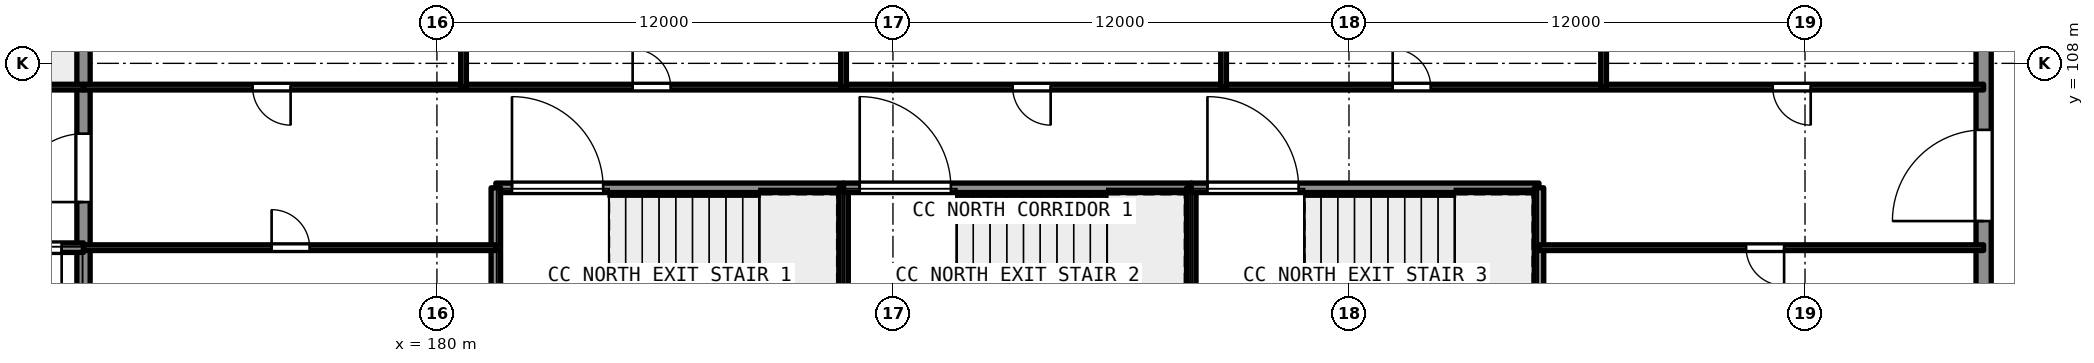
"""IFC4 building model, lengths in metres.
Left out: names, types, materials, properties, quantities, classifications, styles, units other than length and angle.
Written with IfcOpenShell. Run it as: python <this file> out.ifc"""

import sys

from ifc_helpers import new_model, si_unit, direction, frame, frame_2d, origin, place, context, subcontext, project, spatial, rectangle, extrude, element, fill, save


model = new_model("IFC4")
c1 = context("Model", 3, precision=1e-05, world=origin(), true_north=direction((0.0, 1.0)))
c2 = subcontext(c1, "Body", "Model", "MODEL_VIEW")
j1 = project(units=[si_unit("LENGTHUNIT", "METRE"), si_unit("PLANEANGLEUNIT", "RADIAN")], contexts=[c1])
p1 = place(None, origin())
s1 = spatial("IfcSite", under=j1, at=p1, CompositionType="ELEMENT")
p2 = place(p1, origin())
s2 = spatial("IfcBuilding", under=s1, at=p2, CompositionType="ELEMENT")
p3 = place(p2, frame((0.0, 0.0, 9.0)))
s3 = spatial("IfcBuildingStorey", under=s2, at=p3, CompositionType="ELEMENT", Elevation=9.0)
p4 = place(p3, frame((220.7, 100.4, 0.0), z_axis=(0.0, 0.0, 1.0), x_axis=(0.0, 1.0, 0.0)))
e1 = element("IfcWall", 1, at=p4, inside=s3, PredefinedType="SHEAR", context=c2, shape_type="SweptSolid", body=[
    extrude(rectangle(XDim=9.2, YDim=0.4, at=frame_2d((4.6, 0.0))), origin(), (0.0, 0.0, 1.0), 6.0),
])
p5 = place(p4, frame((3.45, 0.0, 0.0)))
e2 = element("IfcOpeningElement", 2, at=p5, cuts=e1, PredefinedType="OPENING", context=c2, shape_type="SweptSolid", body=[
    extrude(rectangle(XDim=2.4, YDim=2.4, at=frame_2d((1.2, 1.2))), frame((0.0, 0.21, 0.0), z_axis=(0.0, -1.0, 0.0), x_axis=(1.0, 0.0, 0.0)), (0.0, 0.0, 1.0), 0.421),
])
p6 = place(p3, frame((170.7, 100.0, 0.0), z_axis=(0.0, 0.0, 1.0), x_axis=(0.0, 1.0, 0.0)))
e3 = element("IfcWall", 3, at=p6, inside=s3, PredefinedType="SHEAR", context=c2, shape_type="SweptSolid", body=[
    extrude(rectangle(XDim=3.15, YDim=0.35, at=frame_2d((1.575, 0.0))), origin(), (0.0, 0.0, 1.0), 5.59),
])
p7 = place(p3, frame((170.7, 103.15, 0.0), z_axis=(0.0, 0.0, 1.0), x_axis=(0.0, 1.0, 0.0)))
e4 = element("IfcWall", 4, at=p7, inside=s3, PredefinedType="SHEAR", context=c2, shape_type="SweptSolid", body=[
    extrude(rectangle(XDim=7.25, YDim=0.35, at=frame_2d((3.625, 0.0))), origin(), (0.0, 0.0, 1.0), 5.59),
])
p8 = place(p7, frame((1.2, 0.0, 0.0)))
e5 = element("IfcOpeningElement", 5, at=p8, cuts=e4, PredefinedType="OPENING", context=c2, shape_type="SweptSolid", body=[
    extrude(rectangle(XDim=1.8, YDim=2.1, at=frame_2d((0.9, 1.05))), frame((0.0, 0.186, 0.0), z_axis=(0.0, -1.0, 0.0), x_axis=(1.0, 0.0, 0.0)), (0.0, 0.0, 1.0), 0.371),
])
p9 = place(p3, frame((163.0, 103.15, 0.0), z_axis=(0.0, 0.0, 1.0), x_axis=(1.0, 0.0, 0.0)))
e6 = element("IfcWall", 6, at=p9, inside=s3, PredefinedType="SHEAR", context=c2, shape_type="SweptSolid", body=[
    extrude(rectangle(XDim=7.7, YDim=0.25, at=frame_2d((3.85, 0.0))), origin(), (0.0, 0.0, 1.0), 5.59),
])
p10 = place(p9, frame((5.925, 0.0, 0.0)))
e7 = element("IfcOpeningElement", 7, at=p10, cuts=e6, PredefinedType="OPENING", context=c2, shape_type="SweptSolid", body=[
    extrude(rectangle(XDim=1.2, YDim=2.1, at=frame_2d((0.6, 1.05))), frame((0.0, 0.135, 0.0), z_axis=(0.0, -1.0, 0.0), x_axis=(1.0, 0.0, 0.0)), (0.0, 0.0, 1.0), 0.271),
])
p11 = place(p3, frame((163.875, 107.375, 0.0), z_axis=(0.0, 0.0, 1.0), x_axis=(1.0, 0.0, 0.0)))
e8 = element("IfcWall", 8, at=p11, inside=s3, PredefinedType="PARTITIONING", context=c2, shape_type="SweptSolid", body=[
    extrude(rectangle(XDim=6.825, YDim=0.15, at=frame_2d((3.413, 0.0))), origin(), (0.0, 0.0, 1.0), 5.59),
])
p12 = place(p11, frame((2.95, 0.0, 0.0)))
e9 = element("IfcOpeningElement", 9, at=p12, cuts=e8, PredefinedType="OPENING", context=c2, shape_type="SweptSolid", body=[
    extrude(rectangle(XDim=0.9, YDim=2.1, at=frame_2d((0.45, 1.05))), frame((0.0, 0.085, 0.0), z_axis=(0.0, -1.0, 0.0), x_axis=(1.0, 0.0, 0.0)), (0.0, 0.0, 1.0), 0.171),
])
p13 = place(p3, frame((181.55, 104.725, 0.0), z_axis=(0.0, 0.0, 1.0), x_axis=(1.0, 0.0, 0.0)))
e10 = element("IfcWall", 10, at=p13, inside=s3, PredefinedType="SHEAR", context=c2, shape_type="SweptSolid", body=[
    extrude(rectangle(XDim=9.15, YDim=0.25, at=frame_2d((4.575, 0.0))), origin(), (0.0, 0.0, 1.0), 5.59),
])
p14 = place(p13, frame((0.425, 0.0, 0.0)))
e11 = element("IfcOpeningElement", 11, at=p14, cuts=e10, PredefinedType="OPENING", context=c2, shape_type="SweptSolid", body=[
    extrude(rectangle(XDim=2.4, YDim=2.1, at=frame_2d((1.2, 1.05))), frame((0.0, 0.135, 0.0), z_axis=(0.0, -1.0, 0.0), x_axis=(1.0, 0.0, 0.0)), (0.0, 0.0, 1.0), 0.271),
])
p15 = place(p3, frame((181.55, 100.2, 0.0), z_axis=(0.0, 0.0, 1.0), x_axis=(0.0, 1.0, 0.0)))
e12 = element("IfcWall", 12, at=p15, inside=s3, PredefinedType="SHEAR", context=c2, shape_type="SweptSolid", body=[
    extrude(rectangle(XDim=4.525, YDim=0.25, at=frame_2d((2.263, 0.0))), origin(), (0.0, 0.0, 1.0), 5.59),
])
p16 = place(p3, frame((190.7, 100.4, 0.0), z_axis=(0.0, 0.0, 1.0), x_axis=(0.0, 1.0, 0.0)))
e13 = element("IfcWall", 13, at=p16, inside=s3, PredefinedType="SHEAR", context=c2, shape_type="SweptSolid", body=[
    extrude(rectangle(XDim=4.325, YDim=0.25, at=frame_2d((2.163, 0.0))), origin(), (0.0, 0.0, 1.0), 5.59),
])
p17 = place(p3, frame((190.7, 104.725, 0.0), z_axis=(0.0, 0.0, 1.0), x_axis=(1.0, 0.0, 0.0)))
e14 = element("IfcWall", 14, at=p17, inside=s3, PredefinedType="SHEAR", context=c2, shape_type="SweptSolid", body=[
    extrude(rectangle(XDim=9.15, YDim=0.25, at=frame_2d((4.575, 0.0))), origin(), (0.0, 0.0, 1.0), 5.59),
])
p18 = place(p17, frame((0.425, 0.0, 0.0)))
e15 = element("IfcOpeningElement", 15, at=p18, cuts=e14, PredefinedType="OPENING", context=c2, shape_type="SweptSolid", body=[
    extrude(rectangle(XDim=2.4, YDim=2.1, at=frame_2d((1.2, 1.05))), frame((0.0, 0.135, 0.0), z_axis=(0.0, -1.0, 0.0), x_axis=(1.0, 0.0, 0.0)), (0.0, 0.0, 1.0), 0.271),
])
p19 = place(p3, frame((199.85, 100.2, 0.0), z_axis=(0.0, 0.0, 1.0), x_axis=(0.0, 1.0, 0.0)))
e16 = element("IfcWall", 16, at=p19, inside=s3, PredefinedType="SHEAR", context=c2, shape_type="SweptSolid", body=[
    extrude(rectangle(XDim=4.525, YDim=0.25, at=frame_2d((2.263, 0.0))), origin(), (0.0, 0.0, 1.0), 5.59),
])
p20 = place(p3, frame((199.85, 104.725, 0.0), z_axis=(0.0, 0.0, 1.0), x_axis=(1.0, 0.0, 0.0)))
e17 = element("IfcWall", 17, at=p20, inside=s3, PredefinedType="SHEAR", context=c2, shape_type="SweptSolid", body=[
    extrude(rectangle(XDim=9.15, YDim=0.25, at=frame_2d((4.575, 0.0))), origin(), (0.0, 0.0, 1.0), 5.59),
])
p21 = place(p20, frame((0.425, 0.0, 0.0)))
e18 = element("IfcOpeningElement", 18, at=p21, cuts=e17, PredefinedType="OPENING", context=c2, shape_type="SweptSolid", body=[
    extrude(rectangle(XDim=2.4, YDim=2.1, at=frame_2d((1.2, 1.05))), frame((0.0, 0.135, 0.0), z_axis=(0.0, -1.0, 0.0), x_axis=(1.0, 0.0, 0.0)), (0.0, 0.0, 1.0), 0.271),
])
p22 = place(p3, frame((209.0, 100.0, 0.0), z_axis=(0.0, 0.0, 1.0), x_axis=(0.0, 1.0, 0.0)))
e19 = element("IfcWall", 19, at=p22, inside=s3, PredefinedType="SHEAR", context=c2, shape_type="SweptSolid", body=[
    extrude(rectangle(XDim=4.725, YDim=0.25, at=frame_2d((2.363, 0.0))), origin(), (0.0, 0.0, 1.0), 5.59),
])
p23 = place(p3, frame((170.7, 103.15, 0.0), z_axis=(0.0, 0.0, 1.0), x_axis=(1.0, 0.0, 0.0)))
e20 = element("IfcWall", 20, at=p23, inside=s3, PredefinedType="PARTITIONING", context=c2, shape_type="SweptSolid", body=[
    extrude(rectangle(XDim=10.85, YDim=0.15, at=frame_2d((5.425, 0.0))), origin(), (0.0, 0.0, 1.0), 5.59),
])
p24 = place(p23, frame((4.95, 0.0, 0.0)))
e21 = element("IfcOpeningElement", 21, at=p24, cuts=e20, PredefinedType="OPENING", context=c2, shape_type="SweptSolid", body=[
    extrude(rectangle(XDim=1.0, YDim=2.1, at=frame_2d((0.5, 1.05))), frame((0.0, 0.085, 0.0), z_axis=(0.0, -1.0, 0.0), x_axis=(1.0, 0.0, 0.0)), (0.0, 0.0, 1.0), 0.171),
])
p25 = place(p3, frame((209.0, 103.15, 0.0), z_axis=(0.0, 0.0, 1.0), x_axis=(1.0, 0.0, 0.0)))
e22 = element("IfcWall", 22, at=p25, inside=s3, PredefinedType="PARTITIONING", context=c2, shape_type="SweptSolid", body=[
    extrude(rectangle(XDim=11.7, YDim=0.15, at=frame_2d((5.85, 0.0))), origin(), (0.0, 0.0, 1.0), 5.59),
])
p26 = place(p25, frame((5.45, 0.0, 0.0)))
e23 = element("IfcOpeningElement", 23, at=p26, cuts=e22, PredefinedType="OPENING", context=c2, shape_type="SweptSolid", body=[
    extrude(rectangle(XDim=1.0, YDim=2.1, at=frame_2d((0.5, 1.05))), frame((0.0, 0.085, 0.0), z_axis=(0.0, -1.0, 0.0), x_axis=(1.0, 0.0, 0.0)), (0.0, 0.0, 1.0), 0.171),
])
p27 = place(p3, frame((220.7, 107.375, 0.0), z_axis=(0.0, 0.0, 1.0), x_axis=(-1.0, 0.0, 0.0)))
e24 = element("IfcWall", 24, at=p27, inside=s3, PredefinedType="PARTITIONING", context=c2, shape_type="SweptSolid", body=[
    extrude(rectangle(XDim=50.0, YDim=0.15, at=frame_2d((25.0, 0.0))), origin(), (0.0, 0.0, 1.0), 5.59),
])
p28 = place(p27, frame((44.55, 0.0, 0.0)))
e25 = element("IfcOpeningElement", 25, at=p28, cuts=e24, PredefinedType="OPENING", context=c2, shape_type="SweptSolid", body=[
    extrude(rectangle(XDim=1.0, YDim=2.1, at=frame_2d((0.5, 1.05))), frame((0.0, 0.085, 0.0), z_axis=(0.0, -1.0, 0.0), x_axis=(1.0, 0.0, 0.0)), (0.0, 0.0, 1.0), 0.171),
])
p29 = place(p27, frame((34.55, 0.0, 0.0)))
e26 = element("IfcOpeningElement", 26, at=p29, cuts=e24, PredefinedType="OPENING", context=c2, shape_type="SweptSolid", body=[
    extrude(rectangle(XDim=1.0, YDim=2.1, at=frame_2d((0.5, 1.05))), frame((0.0, 0.085, 0.0), z_axis=(0.0, -1.0, 0.0), x_axis=(1.0, 0.0, 0.0)), (0.0, 0.0, 1.0), 0.171),
])
p30 = place(p27, frame((24.55, 0.0, 0.0)))
e27 = element("IfcOpeningElement", 27, at=p30, cuts=e24, PredefinedType="OPENING", context=c2, shape_type="SweptSolid", body=[
    extrude(rectangle(XDim=1.0, YDim=2.1, at=frame_2d((0.5, 1.05))), frame((0.0, 0.085, 0.0), z_axis=(0.0, -1.0, 0.0), x_axis=(1.0, 0.0, 0.0)), (0.0, 0.0, 1.0), 0.171),
])
p31 = place(p27, frame((14.55, 0.0, 0.0)))
e28 = element("IfcOpeningElement", 28, at=p31, cuts=e24, PredefinedType="OPENING", context=c2, shape_type="SweptSolid", body=[
    extrude(rectangle(XDim=1.0, YDim=2.1, at=frame_2d((0.5, 1.05))), frame((0.0, 0.085, 0.0), z_axis=(0.0, -1.0, 0.0), x_axis=(1.0, 0.0, 0.0)), (0.0, 0.0, 1.0), 0.171),
])
p32 = place(p27, frame((4.55, 0.0, 0.0)))
e29 = element("IfcOpeningElement", 29, at=p32, cuts=e24, PredefinedType="OPENING", context=c2, shape_type="SweptSolid", body=[
    extrude(rectangle(XDim=1.0, YDim=2.1, at=frame_2d((0.5, 1.05))), frame((0.0, 0.085, 0.0), z_axis=(0.0, -1.0, 0.0), x_axis=(1.0, 0.0, 0.0)), (0.0, 0.0, 1.0), 0.171),
])
for number, where, z_axis, x_axis in (
    (30, (180.7, 107.375, 0.0), (0.0, 0.0, 1.0), (0.0, 1.0, 0.0)),
    (31, (190.7, 107.375, 0.0), (0.0, 0.0, 1.0), (0.0, 1.0, 0.0)),
    (32, (200.7, 107.375, 0.0), (0.0, 0.0, 1.0), (0.0, 1.0, 0.0)),
    (33, (210.7, 107.375, 0.0), (0.0, 0.0, 1.0), (0.0, 1.0, 0.0)),
):
    element("IfcWall", number, at=place(p3, frame(where, z_axis=z_axis, x_axis=x_axis)), inside=s3, PredefinedType="PARTITIONING", context=c2, shape_type="SweptSolid", body=[
        extrude(rectangle(XDim=2.225, YDim=0.15, at=frame_2d((1.113, 0.0))), origin(), (0.0, 0.0, 1.0), 5.59),
    ])
p33 = place(p8, origin())
e34 = element("IfcDoor", 34, at=p33, inside=s3, OperationType="DOUBLE_DOOR_SINGLE_SWING", PredefinedType="DOOR", context=c2, shape_type="SweptSolid", body=[
    extrude(rectangle(XDim=1.8, YDim=2.1, at=frame_2d((0.9, 1.05))), frame((0.0, 0.025, 0.0), z_axis=(0.0, -1.0, 0.0), x_axis=(1.0, 0.0, 0.0)), (0.0, 0.0, 1.0), 0.05),
])
fill(e5, e34)
p34 = place(p5, origin())
e35 = element("IfcDoor", 35, at=p34, inside=s3, OperationType="DOUBLE_DOOR_SINGLE_SWING", PredefinedType="DOOR", context=c2, shape_type="SweptSolid", body=[
    extrude(rectangle(XDim=2.4, YDim=2.4, at=frame_2d((1.2, 1.2))), frame((0.0, 0.025, 0.0), z_axis=(0.0, -1.0, 0.0), x_axis=(1.0, 0.0, 0.0)), (0.0, 0.0, 1.0), 0.05),
])
fill(e2, e35)
p35 = place(p24, origin())
e36 = element("IfcDoor", 36, at=p35, inside=s3, OperationType="SINGLE_SWING_LEFT", PredefinedType="DOOR", context=c2, shape_type="SweptSolid", body=[
    extrude(rectangle(XDim=1.0, YDim=2.1, at=frame_2d((0.5, 1.05))), frame((0.0, 0.025, 0.0), z_axis=(0.0, -1.0, 0.0), x_axis=(1.0, 0.0, 0.0)), (0.0, 0.0, 1.0), 0.05),
])
fill(e21, e36)
p36 = place(p26, origin())
e37 = element("IfcDoor", 37, at=p36, inside=s3, OperationType="SINGLE_SWING_RIGHT", PredefinedType="DOOR", context=c2, shape_type="SweptSolid", body=[
    extrude(rectangle(XDim=1.0, YDim=2.1, at=frame_2d((0.5, 1.05))), frame((0.0, 0.025, 0.0), z_axis=(0.0, -1.0, 0.0), x_axis=(1.0, 0.0, 0.0)), (0.0, 0.0, 1.0), 0.05),
])
fill(e23, e37)
p37 = place(p28, origin())
e38 = element("IfcDoor", 38, at=p37, inside=s3, OperationType="SINGLE_SWING_LEFT", PredefinedType="DOOR", context=c2, shape_type="SweptSolid", body=[
    extrude(rectangle(XDim=1.0, YDim=2.1, at=frame_2d((0.5, 1.05))), frame((0.0, 0.025, 0.0), z_axis=(0.0, -1.0, 0.0), x_axis=(1.0, 0.0, 0.0)), (0.0, 0.0, 1.0), 0.05),
])
fill(e25, e38)
p38 = place(p29, origin())
e39 = element("IfcDoor", 39, at=p38, inside=s3, OperationType="SINGLE_SWING_RIGHT", PredefinedType="DOOR", context=c2, shape_type="SweptSolid", body=[
    extrude(rectangle(XDim=1.0, YDim=2.1, at=frame_2d((0.5, 1.05))), frame((0.0, 0.025, 0.0), z_axis=(0.0, -1.0, 0.0), x_axis=(1.0, 0.0, 0.0)), (0.0, 0.0, 1.0), 0.05),
])
fill(e26, e39)
p39 = place(p30, origin())
e40 = element("IfcDoor", 40, at=p39, inside=s3, OperationType="SINGLE_SWING_LEFT", PredefinedType="DOOR", context=c2, shape_type="SweptSolid", body=[
    extrude(rectangle(XDim=1.0, YDim=2.1, at=frame_2d((0.5, 1.05))), frame((0.0, 0.025, 0.0), z_axis=(0.0, -1.0, 0.0), x_axis=(1.0, 0.0, 0.0)), (0.0, 0.0, 1.0), 0.05),
])
fill(e27, e40)
p40 = place(p31, origin())
e41 = element("IfcDoor", 41, at=p40, inside=s3, OperationType="SINGLE_SWING_RIGHT", PredefinedType="DOOR", context=c2, shape_type="SweptSolid", body=[
    extrude(rectangle(XDim=1.0, YDim=2.1, at=frame_2d((0.5, 1.05))), frame((0.0, 0.025, 0.0), z_axis=(0.0, -1.0, 0.0), x_axis=(1.0, 0.0, 0.0)), (0.0, 0.0, 1.0), 0.05),
])
fill(e28, e41)
p41 = place(p32, origin())
e42 = element("IfcDoor", 42, at=p41, inside=s3, OperationType="SINGLE_SWING_LEFT", PredefinedType="DOOR", context=c2, shape_type="SweptSolid", body=[
    extrude(rectangle(XDim=1.0, YDim=2.1, at=frame_2d((0.5, 1.05))), frame((0.0, 0.025, 0.0), z_axis=(0.0, -1.0, 0.0), x_axis=(1.0, 0.0, 0.0)), (0.0, 0.0, 1.0), 0.05),
])
fill(e29, e42)
p42 = place(p10, origin())
e43 = element("IfcDoor", 43, at=p42, inside=s3, OperationType="SINGLE_SWING_RIGHT", PredefinedType="DOOR", context=c2, shape_type="SweptSolid", body=[
    extrude(rectangle(XDim=1.2, YDim=2.1, at=frame_2d((0.6, 1.05))), frame((0.0, 0.025, 0.0), z_axis=(0.0, -1.0, 0.0), x_axis=(1.0, 0.0, 0.0)), (0.0, 0.0, 1.0), 0.05),
])
fill(e7, e43)
p43 = place(p14, origin())
e44 = element("IfcDoor", 44, at=p43, inside=s3, OperationType="DOUBLE_DOOR_SINGLE_SWING", PredefinedType="DOOR", context=c2, shape_type="SweptSolid", body=[
    extrude(rectangle(XDim=2.4, YDim=2.1, at=frame_2d((1.2, 1.05))), frame((0.0, 0.025, 0.0), z_axis=(0.0, -1.0, 0.0), x_axis=(1.0, 0.0, 0.0)), (0.0, 0.0, 1.0), 0.05),
])
fill(e11, e44)
p44 = place(p18, origin())
e45 = element("IfcDoor", 45, at=p44, inside=s3, OperationType="DOUBLE_DOOR_SINGLE_SWING", PredefinedType="DOOR", context=c2, shape_type="SweptSolid", body=[
    extrude(rectangle(XDim=2.4, YDim=2.1, at=frame_2d((1.2, 1.05))), frame((0.0, 0.025, 0.0), z_axis=(0.0, -1.0, 0.0), x_axis=(1.0, 0.0, 0.0)), (0.0, 0.0, 1.0), 0.05),
])
fill(e15, e45)
p45 = place(p21, origin())
e46 = element("IfcDoor", 46, at=p45, inside=s3, OperationType="DOUBLE_DOOR_SINGLE_SWING", PredefinedType="DOOR", context=c2, shape_type="SweptSolid", body=[
    extrude(rectangle(XDim=2.4, YDim=2.1, at=frame_2d((1.2, 1.05))), frame((0.0, 0.025, 0.0), z_axis=(0.0, -1.0, 0.0), x_axis=(1.0, 0.0, 0.0)), (0.0, 0.0, 1.0), 0.05),
])
fill(e18, e46)
save(model, sys.argv[1])
